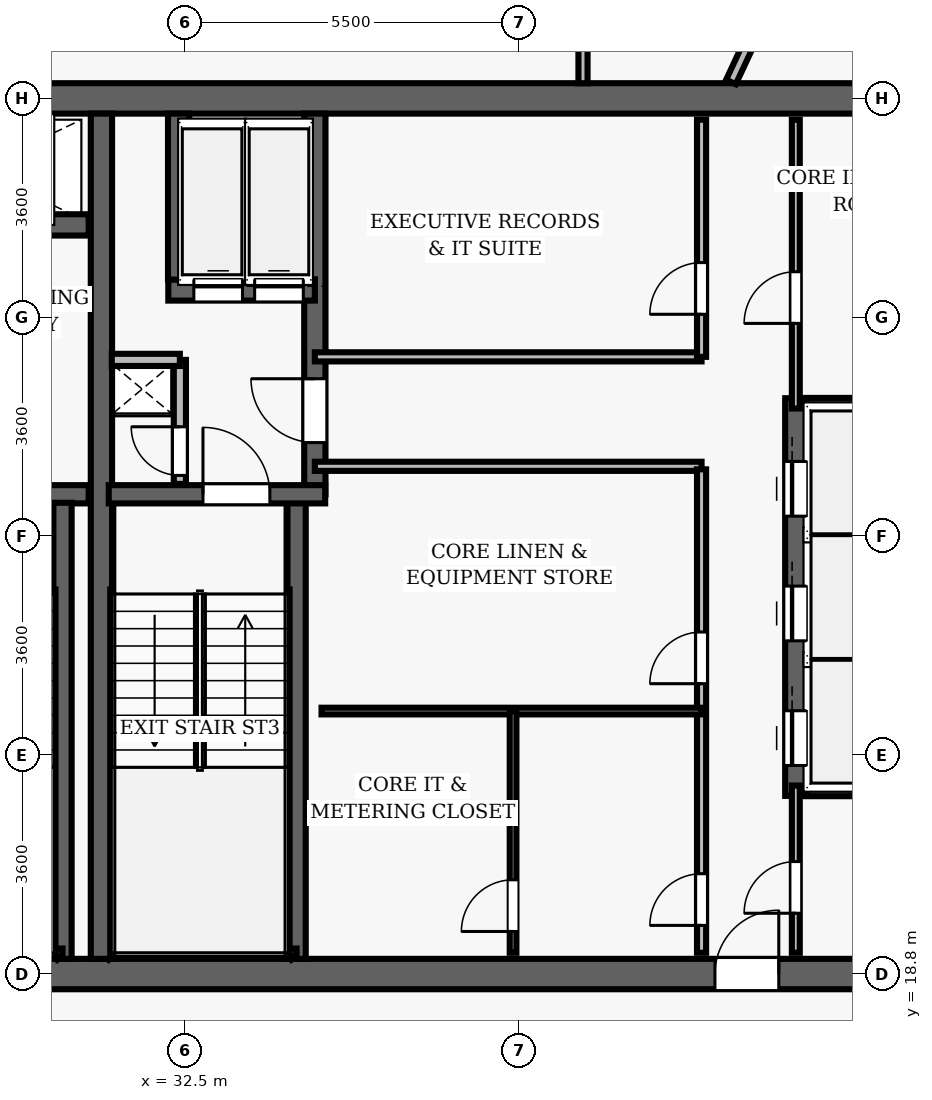
"""IFC4 building model, lengths in metres.
Left out: names, types, materials, properties, quantities, classifications, styles, units other than length and angle.
Written with IfcOpenShell. Run it as: python <this file> out.ifc"""

import sys

from ifc_helpers import new_model, si_unit, direction, frame, frame_2d, origin, place, context, subcontext, project, spatial, rectangle, extrude, element, fill, save


model = new_model("IFC4")
c1 = context("Model", 3, precision=1e-05, world=origin(), true_north=direction((0.0, 1.0)))
c2 = subcontext(c1, "Body", "Model", "MODEL_VIEW")
j1 = project(units=[si_unit("LENGTHUNIT", "METRE"), si_unit("PLANEANGLEUNIT", "RADIAN")], contexts=[c1])
p1 = place(None, origin())
s1 = spatial("IfcSite", under=j1, at=p1, CompositionType="ELEMENT")
p2 = place(p1, origin())
s2 = spatial("IfcBuilding", under=s1, at=p2, CompositionType="ELEMENT")
p3 = place(p2, frame((0.0, 0.0, 242.05)))
s3 = spatial("IfcBuildingStorey", under=s2, at=p3, CompositionType="ELEMENT", Elevation=242.05)
p4 = place(p3, frame((26.75, 18.8, 0.0), z_axis=(0.0, 0.0, 1.0), x_axis=(1.0, 0.0, 0.0)))
e1 = element("IfcWall", 1, at=p4, inside=s3, PredefinedType="SHEAR", context=c2, shape_type="SweptSolid", body=[
    extrude(rectangle(XDim=22.5, YDim=0.5, at=frame_2d((11.25, 0.0))), origin(), (0.0, 0.0, 1.0), 3.85),
])
p5 = place(p4, frame((14.47, 0.0, 0.0)))
e2 = element("IfcOpeningElement", 2, at=p5, cuts=e1, PredefinedType="OPENING", context=c2, shape_type="SweptSolid", body=[
    extrude(rectangle(XDim=1.05, YDim=2.15, at=frame_2d((0.525, 1.075))), frame((0.0, 0.26, 0.0), z_axis=(0.0, -1.0, 0.0), x_axis=(1.0, 0.0, 0.0)), (0.0, 0.0, 1.0), 0.52),
])
p6 = place(p3, frame((26.75, 33.2, 0.0), z_axis=(0.0, 0.0, 1.0), x_axis=(1.0, 0.0, 0.0)))
e3 = element("IfcWall", 3, at=p6, inside=s3, PredefinedType="SHEAR", context=c2, shape_type="SweptSolid", body=[
    extrude(rectangle(XDim=22.5, YDim=0.5, at=frame_2d((11.25, 0.0))), origin(), (0.0, 0.0, 1.0), 3.85),
])
p7 = place(p3, frame((31.13, 19.05, 0.0), z_axis=(0.0, 0.0, 1.0), x_axis=(0.0, 1.0, 0.0)))
e4 = element("IfcWall", 4, at=p7, inside=s3, PredefinedType="SHEAR", context=c2, shape_type="SweptSolid", body=[
    extrude(rectangle(XDim=13.9, YDim=0.35, at=frame_2d((6.95, 0.0))), origin(), (0.0, 0.0, 1.0), 3.85),
])
p8 = place(p3, frame((27.25, 26.69, 0.0), z_axis=(0.0, 0.0, 1.0), x_axis=(1.0, 0.0, 0.0)))
e5 = element("IfcWall", 5, at=p8, inside=s3, PredefinedType="SHEAR", context=c2, shape_type="SweptSolid", body=[
    extrude(rectangle(XDim=3.67, YDim=0.3, at=frame_2d((1.835, 0.0))), origin(), (0.0, 0.0, 1.0), 3.85),
])
p9 = place(p8, frame((1.05, 0.0, 0.0)))
e6 = element("IfcOpeningElement", 6, at=p9, cuts=e5, PredefinedType="OPENING", context=c2, shape_type="SweptSolid", body=[
    extrude(rectangle(XDim=1.1, YDim=2.15, at=frame_2d((0.55, 1.075))), frame((0.0, 0.16, 0.0), z_axis=(0.0, -1.0, 0.0), x_axis=(1.0, 0.0, 0.0)), (0.0, 0.0, 1.0), 0.32),
])
p10 = place(p3, frame((30.49, 19.05, 0.0), z_axis=(0.0, 0.0, 1.0), x_axis=(0.0, 1.0, 0.0)))
e7 = element("IfcWall", 7, at=p10, inside=s3, PredefinedType="SHEAR", context=c2, shape_type="SweptSolid", body=[
    extrude(rectangle(XDim=7.5, YDim=0.3, at=frame_2d((3.75, 0.0))), origin(), (0.0, 0.0, 1.0), 3.85),
])
p11 = place(p3, frame((27.395, 19.16, 0.0), z_axis=(0.0, 0.0, 1.0), x_axis=(1.0, 0.0, 0.0)))
e8 = element("IfcWall", 8, at=p11, inside=s3, PredefinedType="SHEAR", context=c2, shape_type="SweptSolid", body=[
    extrude(rectangle(XDim=3.095, YDim=0.12, at=frame_2d((1.547, 0.0))), origin(), (0.0, 0.0, 1.0), 3.85),
])
p12 = place(p3, frame((27.25, 31.12, 0.0), z_axis=(0.0, 0.0, 1.0), x_axis=(1.0, 0.0, 0.0)))
e9 = element("IfcWall", 9, at=p12, inside=s3, PredefinedType="SHEAR", context=c2, shape_type="SweptSolid", body=[
    extrude(rectangle(XDim=3.67, YDim=0.35, at=frame_2d((1.835, 0.0))), origin(), (0.0, 0.0, 1.0), 3.04),
])
p13 = place(p12, frame((1.25, 0.0, 0.0)))
e10 = element("IfcOpeningElement", 10, at=p13, cuts=e9, PredefinedType="OPENING", context=c2, shape_type="SweptSolid", body=[
    extrude(rectangle(XDim=1.1, YDim=2.15, at=frame_2d((0.55, 1.075))), frame((0.0, 0.185, 0.0), z_axis=(0.0, -1.0, 0.0), x_axis=(1.0, 0.0, 0.0)), (0.0, 0.0, 1.0), 0.37),
])
p14 = place(p3, frame((34.34, 19.05, 0.0), z_axis=(0.0, 0.0, 1.0), x_axis=(0.0, 1.0, 0.0)))
e11 = element("IfcWall", 11, at=p14, inside=s3, PredefinedType="SHEAR", context=c2, shape_type="SweptSolid", body=[
    extrude(rectangle(XDim=7.5, YDim=0.3, at=frame_2d((3.75, 0.0))), origin(), (0.0, 0.0, 1.0), 3.85),
])
p15 = place(p3, frame((34.64, 26.69, 0.0), z_axis=(0.0, 0.0, 1.0), x_axis=(0.0, 1.0, 0.0)))
e12 = element("IfcWall", 12, at=p15, inside=s3, PredefinedType="SHEAR", context=c2, shape_type="SweptSolid", body=[
    extrude(rectangle(XDim=6.26, YDim=0.35, at=frame_2d((3.13, 0.0))), origin(), (0.0, 0.0, 1.0), 3.85),
])
p16 = place(p15, frame((0.85, 0.0, 0.0)))
e13 = element("IfcOpeningElement", 13, at=p16, cuts=e12, PredefinedType="OPENING", context=c2, shape_type="SweptSolid", body=[
    extrude(rectangle(XDim=1.05, YDim=2.15, at=frame_2d((0.525, 1.075))), frame((0.0, 0.185, 0.0), z_axis=(0.0, -1.0, 0.0), x_axis=(1.0, 0.0, 0.0)), (0.0, 0.0, 1.0), 0.37),
])
p17 = place(p3, frame((31.25, 26.69, 0.0), z_axis=(0.0, 0.0, 1.0), x_axis=(1.0, 0.0, 0.0)))
e14 = element("IfcWall", 14, at=p17, inside=s3, PredefinedType="SHEAR", context=c2, shape_type="SweptSolid", body=[
    extrude(rectangle(XDim=3.56, YDim=0.3, at=frame_2d((1.78, 0.0))), origin(), (0.0, 0.0, 1.0), 3.85),
])
p18 = place(p17, frame((1.55, 0.0, 0.0)))
e15 = element("IfcOpeningElement", 15, at=p18, cuts=e14, PredefinedType="OPENING", context=c2, shape_type="SweptSolid", body=[
    extrude(rectangle(XDim=1.1, YDim=2.15, at=frame_2d((0.55, 1.075))), frame((0.0, 0.16, 0.0), z_axis=(0.0, -1.0, 0.0), x_axis=(1.0, 0.0, 0.0)), (0.0, 0.0, 1.0), 0.32),
])
p19 = place(p3, frame((31.3, 19.16, 0.0), z_axis=(0.0, 0.0, 1.0), x_axis=(1.0, 0.0, 0.0)))
e16 = element("IfcWall", 16, at=p19, inside=s3, PredefinedType="SHEAR", context=c2, shape_type="SweptSolid", body=[
    extrude(rectangle(XDim=3.04, YDim=0.12, at=frame_2d((1.52, 0.0))), origin(), (0.0, 0.0, 1.0), 3.85),
])
p20 = place(p3, frame((32.23, 30.05, 0.0), z_axis=(0.0, 0.0, 1.0), x_axis=(1.0, 0.0, 0.0)))
e17 = element("IfcWall", 17, at=p20, inside=s3, PredefinedType="SHEAR", context=c2, shape_type="SweptSolid", body=[
    extrude(rectangle(XDim=2.41, YDim=0.35, at=frame_2d((1.205, 0.0))), origin(), (0.0, 0.0, 1.0), 3.04),
])
p21 = place(p20, frame((0.42, 0.0, 0.0)))
e18 = element("IfcOpeningElement", 18, at=p21, cuts=e17, PredefinedType="OPENING", context=c2, shape_type="SweptSolid", body=[
    extrude(rectangle(XDim=0.8, YDim=2.15, at=frame_2d((0.4, 1.075))), frame((0.0, 0.185, 0.0), z_axis=(0.0, -1.0, 0.0), x_axis=(1.0, 0.0, 0.0)), (0.0, 0.0, 1.0), 0.37),
])
p22 = place(p20, frame((1.42, 0.0, 0.0)))
e19 = element("IfcOpeningElement", 19, at=p22, cuts=e17, PredefinedType="OPENING", context=c2, shape_type="SweptSolid", body=[
    extrude(rectangle(XDim=0.8, YDim=2.15, at=frame_2d((0.4, 1.075))), frame((0.0, 0.185, 0.0), z_axis=(0.0, -1.0, 0.0), x_axis=(1.0, 0.0, 0.0)), (0.0, 0.0, 1.0), 0.37),
])
p23 = place(p3, frame((32.4, 30.22, 0.0), z_axis=(0.0, 0.0, 1.0), x_axis=(0.0, 1.0, 0.0)))
e20 = element("IfcWall", 20, at=p23, inside=s3, PredefinedType="SHEAR", context=c2, shape_type="SweptSolid", body=[
    extrude(rectangle(XDim=2.73, YDim=0.35, at=frame_2d((1.365, 0.0))), origin(), (0.0, 0.0, 1.0), 3.04),
])
p24 = place(p3, frame((32.42, 26.86, 0.0), z_axis=(0.0, 0.0, 1.0), x_axis=(0.0, 1.0, 0.0)))
e21 = element("IfcWall", 21, at=p24, inside=s3, PredefinedType="PARTITIONING", context=c2, shape_type="SweptSolid", body=[
    extrude(rectangle(XDim=2.04, YDim=0.2, at=frame_2d((1.02, 0.0))), origin(), (0.0, 0.0, 1.0), 3.04),
])
p25 = place(p24, frame((0.14, 0.0, 0.0)))
e22 = element("IfcOpeningElement", 22, at=p25, cuts=e21, PredefinedType="OPENING", context=c2, shape_type="SweptSolid", body=[
    extrude(rectangle(XDim=0.8, YDim=2.05, at=frame_2d((0.4, 1.025))), frame((0.0, 0.11, 0.0), z_axis=(0.0, -1.0, 0.0), x_axis=(1.0, 0.0, 0.0)), (0.0, 0.0, 1.0), 0.22),
])
p26 = place(p3, frame((31.3, 28.9, 0.0), z_axis=(0.0, 0.0, 1.0), x_axis=(1.0, 0.0, 0.0)))
e23 = element("IfcWall", 23, at=p26, inside=s3, PredefinedType="PARTITIONING", context=c2, shape_type="SweptSolid", body=[
    extrude(rectangle(XDim=1.12, YDim=0.2, at=frame_2d((0.56, 0.0))), origin(), (0.0, 0.0, 1.0), 3.04),
])
p27 = place(p3, frame((42.55, 21.73, 0.0), z_axis=(0.0, 0.0, 1.0), x_axis=(0.0, 1.0, 0.0)))
e24 = element("IfcWall", 24, at=p27, inside=s3, PredefinedType="SHEAR", context=c2, shape_type="SweptSolid", body=[
    extrude(rectangle(XDim=6.54, YDim=0.35, at=frame_2d((3.27, 0.0))), origin(), (0.0, 0.0, 1.0), 3.04),
])
p28 = place(p27, frame((0.5, 0.0, 0.0)))
e25 = element("IfcOpeningElement", 25, at=p28, cuts=e24, PredefinedType="OPENING", context=c2, shape_type="SweptSolid", body=[
    extrude(rectangle(XDim=0.9, YDim=2.15, at=frame_2d((0.45, 1.075))), frame((0.0, 0.185, 0.0), z_axis=(0.0, -1.0, 0.0), x_axis=(1.0, 0.0, 0.0)), (0.0, 0.0, 1.0), 0.37),
])
p29 = place(p27, frame((2.55, 0.0, 0.0)))
e26 = element("IfcOpeningElement", 26, at=p29, cuts=e24, PredefinedType="OPENING", context=c2, shape_type="SweptSolid", body=[
    extrude(rectangle(XDim=0.9, YDim=2.15, at=frame_2d((0.45, 1.075))), frame((0.0, 0.185, 0.0), z_axis=(0.0, -1.0, 0.0), x_axis=(1.0, 0.0, 0.0)), (0.0, 0.0, 1.0), 0.37),
])
p30 = place(p27, frame((4.6, 0.0, 0.0)))
e27 = element("IfcOpeningElement", 27, at=p30, cuts=e24, PredefinedType="OPENING", context=c2, shape_type="SweptSolid", body=[
    extrude(rectangle(XDim=0.9, YDim=2.15, at=frame_2d((0.45, 1.075))), frame((0.0, 0.185, 0.0), z_axis=(0.0, -1.0, 0.0), x_axis=(1.0, 0.0, 0.0)), (0.0, 0.0, 1.0), 0.37),
])
for number, where, z_axis, x_axis in (
    (28, (42.72, 21.9, 0.0), (0.0, 0.0, 1.0), (1.0, 0.0, 0.0)),
    (29, (42.72, 28.1, 0.0), (0.0, 0.0, 1.0), (1.0, 0.0, 0.0)),
):
    element("IfcWall", number, at=place(p3, frame(where, z_axis=z_axis, x_axis=x_axis)), inside=s3, PredefinedType="SHEAR", context=c2, shape_type="SweptSolid", body=[
        extrude(rectangle(XDim=2.03, YDim=0.35, at=frame_2d((1.015, 0.0))), origin(), (0.0, 0.0, 1.0), 3.04),
    ])
for number, where, z_axis, x_axis in (
    (30, (34.64, 27.15, 0.0), (0.0, 0.0, 1.0), (1.0, 0.0, 0.0)),
    (31, (34.64, 28.95, 0.0), (0.0, 0.0, 1.0), (1.0, 0.0, 0.0)),
):
    element("IfcWall", number, at=place(p3, frame(where, z_axis=z_axis, x_axis=x_axis)), inside=s3, PredefinedType="PARTITIONING", context=c2, shape_type="SweptSolid", body=[
        extrude(rectangle(XDim=6.36, YDim=0.15, at=frame_2d((3.18, 0.0))), origin(), (0.0, 0.0, 1.0), 3.04),
    ])
p31 = place(p3, frame((41.0, 28.95, 0.0), z_axis=(0.0, 0.0, 1.0), x_axis=(0.0, 1.0, 0.0)))
e32 = element("IfcWall", 32, at=p31, inside=s3, PredefinedType="PARTITIONING", context=c2, shape_type="SweptSolid", body=[
    extrude(rectangle(XDim=3.9, YDim=0.15, at=frame_2d((1.95, 0.0))), origin(), (0.0, 0.0, 1.0), 3.04),
])
p32 = place(p31, frame((0.7, 0.0, 0.0)))
e33 = element("IfcOpeningElement", 33, at=p32, cuts=e32, PredefinedType="OPENING", context=c2, shape_type="SweptSolid", body=[
    extrude(rectangle(XDim=0.85, YDim=2.1, at=frame_2d((0.425, 1.05))), frame((0.0, 0.085, 0.0), z_axis=(0.0, -1.0, 0.0), x_axis=(1.0, 0.0, 0.0)), (0.0, 0.0, 1.0), 0.17),
])
p33 = place(p3, frame((41.0, 19.15, 0.0), z_axis=(0.0, 0.0, 1.0), x_axis=(0.0, 1.0, 0.0)))
e34 = element("IfcWall", 34, at=p33, inside=s3, PredefinedType="PARTITIONING", context=c2, shape_type="SweptSolid", body=[
    extrude(rectangle(XDim=7.95, YDim=0.15, at=frame_2d((3.975, 0.0))), origin(), (0.0, 0.0, 1.0), 3.04),
])
p34 = place(p33, frame((4.425, 0.0, 0.0)))
e35 = element("IfcOpeningElement", 35, at=p34, cuts=e34, PredefinedType="OPENING", context=c2, shape_type="SweptSolid", body=[
    extrude(rectangle(XDim=0.85, YDim=2.1, at=frame_2d((0.425, 1.05))), frame((0.0, 0.085, 0.0), z_axis=(0.0, -1.0, 0.0), x_axis=(1.0, 0.0, 0.0)), (0.0, 0.0, 1.0), 0.17),
])
p35 = place(p33, frame((0.45, 0.0, 0.0)))
e36 = element("IfcOpeningElement", 36, at=p35, cuts=e34, PredefinedType="OPENING", context=c2, shape_type="SweptSolid", body=[
    extrude(rectangle(XDim=0.85, YDim=2.1, at=frame_2d((0.425, 1.05))), frame((0.0, 0.085, 0.0), z_axis=(0.0, -1.0, 0.0), x_axis=(1.0, 0.0, 0.0)), (0.0, 0.0, 1.0), 0.17),
])
p36 = place(p3, frame((34.75, 23.125, 0.0), z_axis=(0.0, 0.0, 1.0), x_axis=(1.0, 0.0, 0.0)))
e37 = element("IfcWall", 37, at=p36, inside=s3, PredefinedType="PARTITIONING", context=c2, shape_type="SweptSolid", body=[
    extrude(rectangle(XDim=6.25, YDim=0.11, at=frame_2d((3.125, 0.0))), origin(), (0.0, 0.0, 1.0), 3.04),
])
p37 = place(p3, frame((37.9, 19.15, 0.0), z_axis=(0.0, 0.0, 1.0), x_axis=(0.0, 1.0, 0.0)))
e38 = element("IfcWall", 38, at=p37, inside=s3, PredefinedType="PARTITIONING", context=c2, shape_type="SweptSolid", body=[
    extrude(rectangle(XDim=3.975, YDim=0.11, at=frame_2d((1.988, 0.0))), origin(), (0.0, 0.0, 1.0), 3.04),
])
p38 = place(p37, frame((0.35, 0.0, 0.0)))
e39 = element("IfcOpeningElement", 39, at=p38, cuts=e38, PredefinedType="OPENING", context=c2, shape_type="SweptSolid", body=[
    extrude(rectangle(XDim=0.85, YDim=2.1, at=frame_2d((0.425, 1.05))), frame((0.0, 0.065, 0.0), z_axis=(0.0, -1.0, 0.0), x_axis=(1.0, 0.0, 0.0)), (0.0, 0.0, 1.0), 0.13),
])
p39 = place(p3, frame((42.55, 28.1, 0.0), z_axis=(0.0, 0.0, 1.0), x_axis=(0.0, 1.0, 0.0)))
e40 = element("IfcWall", 40, at=p39, inside=s3, PredefinedType="PARTITIONING", context=c2, shape_type="SweptSolid", body=[
    extrude(rectangle(XDim=4.75, YDim=0.13, at=frame_2d((2.375, 0.0))), origin(), (0.0, 0.0, 1.0), 3.04),
])
p40 = place(p39, frame((1.4, 0.0, 0.0)))
e41 = element("IfcOpeningElement", 41, at=p40, cuts=e40, PredefinedType="OPENING", context=c2, shape_type="SweptSolid", body=[
    extrude(rectangle(XDim=0.85, YDim=2.1, at=frame_2d((0.425, 1.05))), frame((0.0, 0.075, 0.0), z_axis=(0.0, -1.0, 0.0), x_axis=(1.0, 0.0, 0.0)), (0.0, 0.0, 1.0), 0.15),
])
p41 = place(p3, frame((42.55, 19.15, 0.0), z_axis=(0.0, 0.0, 1.0), x_axis=(0.0, 1.0, 0.0)))
e42 = element("IfcWall", 42, at=p41, inside=s3, PredefinedType="PARTITIONING", context=c2, shape_type="SweptSolid", body=[
    extrude(rectangle(XDim=2.75, YDim=0.13, at=frame_2d((1.375, 0.0))), origin(), (0.0, 0.0, 1.0), 3.04),
])
p42 = place(p41, frame((0.65, 0.0, 0.0)))
e43 = element("IfcOpeningElement", 43, at=p42, cuts=e42, PredefinedType="OPENING", context=c2, shape_type="SweptSolid", body=[
    extrude(rectangle(XDim=0.85, YDim=2.1, at=frame_2d((0.425, 1.05))), frame((0.0, 0.075, 0.0), z_axis=(0.0, -1.0, 0.0), x_axis=(1.0, 0.0, 0.0)), (0.0, 0.0, 1.0), 0.15),
])
p43 = place(p3, frame((39.05, 33.45, 0.0), z_axis=(0.0, 0.0, 1.0), x_axis=(0.0, 1.0, 0.0)))
e44 = element("IfcWall", 44, at=p43, inside=s3, PredefinedType="PARTITIONING", context=c2, shape_type="SweptSolid", body=[
    extrude(rectangle(XDim=6.95, YDim=0.15, at=frame_2d((3.475, 0.0))), origin(), (0.0, 0.0, 1.0), 3.04),
])
p44 = place(p3, frame((41.483, 33.47, 0.0), z_axis=(0.0, 0.0, 1.0), x_axis=(0.422609422838, 0.906311908632, 0.0)))
e45 = element("IfcWall", 45, at=p44, inside=s3, PredefinedType="PARTITIONING", context=c2, shape_type="SweptSolid", body=[
    extrude(rectangle(XDim=13.267, YDim=0.175, at=frame_2d((6.634, 0.0))), origin(), (0.0, 0.0, 1.0), 3.04),
])
p45 = place(p18, origin())
e46 = element("IfcDoor", 46, at=p45, inside=s3, OperationType="SINGLE_SWING_LEFT", PredefinedType="DOOR", context=c2, shape_type="SweptSolid", body=[
    extrude(rectangle(XDim=1.1, YDim=2.15, at=frame_2d((0.55, 1.075))), frame((0.0, 0.025, 0.0), z_axis=(0.0, -1.0, 0.0), x_axis=(1.0, 0.0, 0.0)), (0.0, 0.0, 1.0), 0.05),
])
fill(e15, e46)
p46 = place(p25, origin())
e47 = element("IfcDoor", 47, at=p46, inside=s3, OperationType="SINGLE_SWING_RIGHT", PredefinedType="DOOR", context=c2, shape_type="SweptSolid", body=[
    extrude(rectangle(XDim=0.8, YDim=2.05, at=frame_2d((0.4, 1.025))), frame((0.0, 0.025, 0.0), z_axis=(0.0, -1.0, 0.0), x_axis=(1.0, 0.0, 0.0)), (0.0, 0.0, 1.0), 0.05),
])
fill(e22, e47)
p47 = place(p5, origin())
e48 = element("IfcDoor", 48, at=p47, inside=s3, OperationType="SINGLE_SWING_RIGHT", PredefinedType="DOOR", context=c2, shape_type="SweptSolid", body=[
    extrude(rectangle(XDim=1.05, YDim=2.15, at=frame_2d((0.525, 1.075))), frame((0.0, 0.025, 0.0), z_axis=(0.0, -1.0, 0.0), x_axis=(1.0, 0.0, 0.0)), (0.0, 0.0, 1.0), 0.05),
])
fill(e2, e48)
p48 = place(p16, origin())
e49 = element("IfcDoor", 49, at=p48, inside=s3, OperationType="SINGLE_SWING_RIGHT", PredefinedType="DOOR", context=c2, shape_type="SweptSolid", body=[
    extrude(rectangle(XDim=1.05, YDim=2.15, at=frame_2d((0.525, 1.075))), frame((0.0, 0.025, 0.0), z_axis=(0.0, -1.0, 0.0), x_axis=(1.0, 0.0, 0.0)), (0.0, 0.0, 1.0), 0.05),
])
fill(e13, e49)
p49 = place(p32, origin())
e50 = element("IfcDoor", 50, at=p49, inside=s3, OperationType="SINGLE_SWING_LEFT", PredefinedType="DOOR", context=c2, shape_type="SweptSolid", body=[
    extrude(rectangle(XDim=0.85, YDim=2.1, at=frame_2d((0.425, 1.05))), frame((0.0, 0.025, 0.0), z_axis=(0.0, -1.0, 0.0), x_axis=(1.0, 0.0, 0.0)), (0.0, 0.0, 1.0), 0.05),
])
fill(e33, e50)
p50 = place(p34, origin())
e51 = element("IfcDoor", 51, at=p50, inside=s3, OperationType="SINGLE_SWING_LEFT", PredefinedType="DOOR", context=c2, shape_type="SweptSolid", body=[
    extrude(rectangle(XDim=0.85, YDim=2.1, at=frame_2d((0.425, 1.05))), frame((0.0, 0.025, 0.0), z_axis=(0.0, -1.0, 0.0), x_axis=(1.0, 0.0, 0.0)), (0.0, 0.0, 1.0), 0.05),
])
fill(e35, e51)
p51 = place(p35, origin())
e52 = element("IfcDoor", 52, at=p51, inside=s3, OperationType="SINGLE_SWING_LEFT", PredefinedType="DOOR", context=c2, shape_type="SweptSolid", body=[
    extrude(rectangle(XDim=0.85, YDim=2.1, at=frame_2d((0.425, 1.05))), frame((0.0, 0.025, 0.0), z_axis=(0.0, -1.0, 0.0), x_axis=(1.0, 0.0, 0.0)), (0.0, 0.0, 1.0), 0.05),
])
fill(e36, e52)
p52 = place(p38, origin())
e53 = element("IfcDoor", 53, at=p52, inside=s3, OperationType="SINGLE_SWING_LEFT", PredefinedType="DOOR", context=c2, shape_type="SweptSolid", body=[
    extrude(rectangle(XDim=0.85, YDim=2.1, at=frame_2d((0.425, 1.05))), frame((0.0, 0.025, 0.0), z_axis=(0.0, -1.0, 0.0), x_axis=(1.0, 0.0, 0.0)), (0.0, 0.0, 1.0), 0.05),
])
fill(e39, e53)
p53 = place(p40, origin())
e54 = element("IfcDoor", 54, at=p53, inside=s3, OperationType="SINGLE_SWING_LEFT", PredefinedType="DOOR", context=c2, shape_type="SweptSolid", body=[
    extrude(rectangle(XDim=0.85, YDim=2.1, at=frame_2d((0.425, 1.05))), frame((0.0, 0.025, 0.0), z_axis=(0.0, -1.0, 0.0), x_axis=(1.0, 0.0, 0.0)), (0.0, 0.0, 1.0), 0.05),
])
fill(e41, e54)
p54 = place(p42, origin())
e55 = element("IfcDoor", 55, at=p54, inside=s3, OperationType="SINGLE_SWING_LEFT", PredefinedType="DOOR", context=c2, shape_type="SweptSolid", body=[
    extrude(rectangle(XDim=0.85, YDim=2.1, at=frame_2d((0.425, 1.05))), frame((0.0, 0.025, 0.0), z_axis=(0.0, -1.0, 0.0), x_axis=(1.0, 0.0, 0.0)), (0.0, 0.0, 1.0), 0.05),
])
fill(e43, e55)
p55 = place(p28, origin())
e56 = element("IfcDoor", 56, at=p55, inside=s3, OperationType="SLIDING_TO_LEFT", PredefinedType="DOOR", context=c2, shape_type="SweptSolid", body=[
    extrude(rectangle(XDim=0.9, YDim=2.15, at=frame_2d((0.45, 1.075))), frame((0.0, 0.025, 0.0), z_axis=(0.0, -1.0, 0.0), x_axis=(1.0, 0.0, 0.0)), (0.0, 0.0, 1.0), 0.05),
])
fill(e25, e56)
p56 = place(p29, origin())
e57 = element("IfcDoor", 57, at=p56, inside=s3, OperationType="SLIDING_TO_LEFT", PredefinedType="DOOR", context=c2, shape_type="SweptSolid", body=[
    extrude(rectangle(XDim=0.9, YDim=2.15, at=frame_2d((0.45, 1.075))), frame((0.0, 0.025, 0.0), z_axis=(0.0, -1.0, 0.0), x_axis=(1.0, 0.0, 0.0)), (0.0, 0.0, 1.0), 0.05),
])
fill(e26, e57)
p57 = place(p30, origin())
e58 = element("IfcDoor", 58, at=p57, inside=s3, OperationType="SLIDING_TO_LEFT", PredefinedType="DOOR", context=c2, shape_type="SweptSolid", body=[
    extrude(rectangle(XDim=0.9, YDim=2.15, at=frame_2d((0.45, 1.075))), frame((0.0, 0.025, 0.0), z_axis=(0.0, -1.0, 0.0), x_axis=(1.0, 0.0, 0.0)), (0.0, 0.0, 1.0), 0.05),
])
fill(e27, e58)
p58 = place(p21, origin())
e59 = element("IfcDoor", 59, at=p58, inside=s3, OperationType="SLIDING_TO_LEFT", PredefinedType="DOOR", context=c2, shape_type="SweptSolid", body=[
    extrude(rectangle(XDim=0.8, YDim=2.15, at=frame_2d((0.4, 1.075))), frame((0.0, 0.025, 0.0), z_axis=(0.0, -1.0, 0.0), x_axis=(1.0, 0.0, 0.0)), (0.0, 0.0, 1.0), 0.05),
])
fill(e18, e59)
p59 = place(p22, origin())
e60 = element("IfcDoor", 60, at=p59, inside=s3, OperationType="SLIDING_TO_LEFT", PredefinedType="DOOR", context=c2, shape_type="SweptSolid", body=[
    extrude(rectangle(XDim=0.8, YDim=2.15, at=frame_2d((0.4, 1.075))), frame((0.0, 0.025, 0.0), z_axis=(0.0, -1.0, 0.0), x_axis=(1.0, 0.0, 0.0)), (0.0, 0.0, 1.0), 0.05),
])
fill(e19, e60)
save(model, sys.argv[1])
